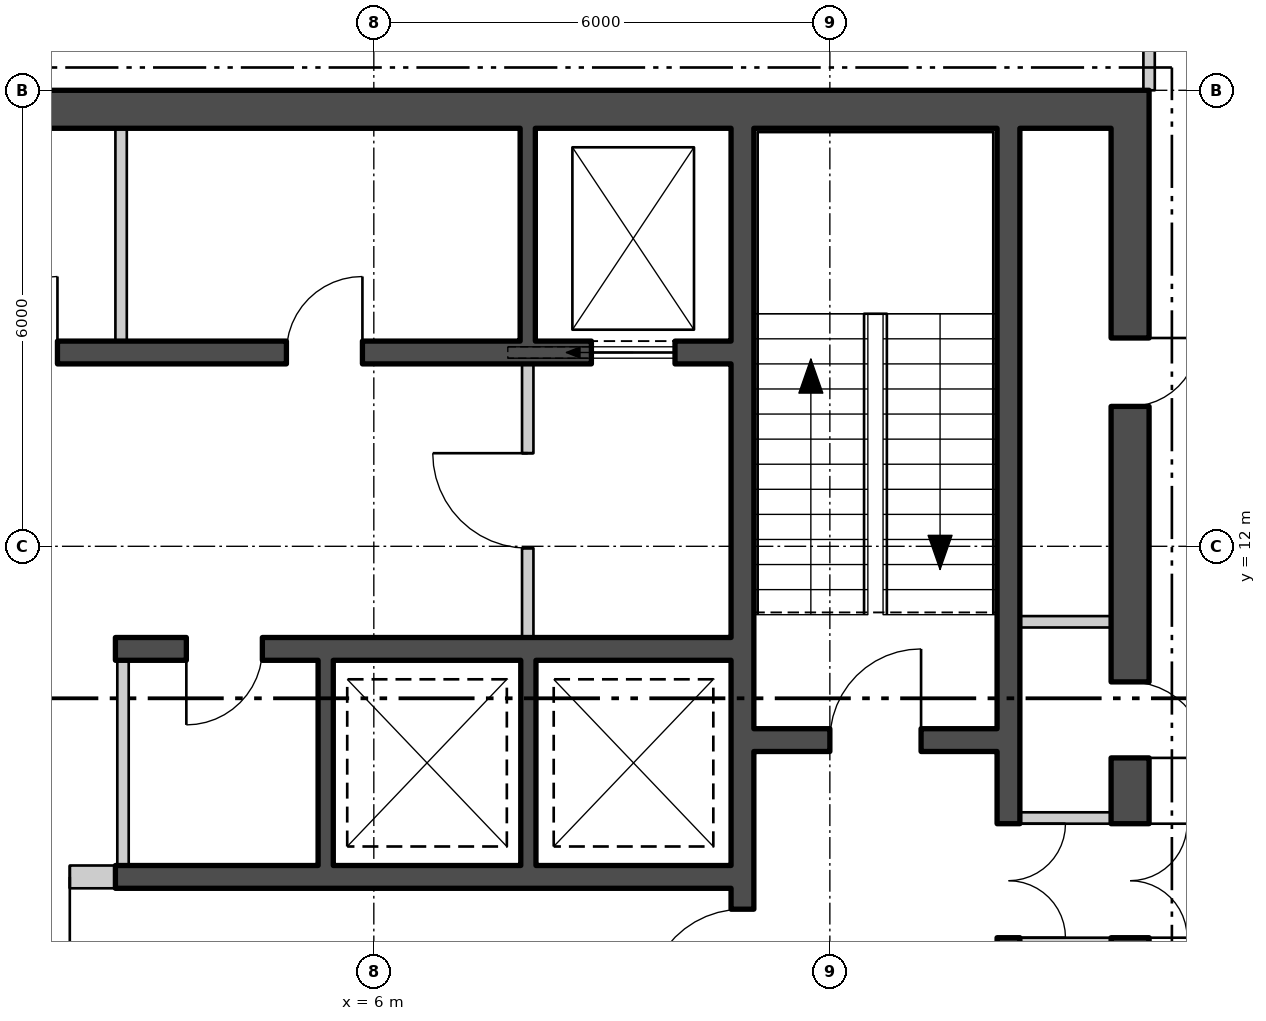
"""IFC4 building model, lengths in metres.
Left out: names, types, materials, properties, quantities, classifications, styles, units other than length and angle.
Written with IfcOpenShell. Run it as: python <this file> out.ifc"""

import sys

from ifc_helpers import new_model, si_unit, direction, frame, frame_2d, origin, place, context, subcontext, project, spatial, polyline, rectangle, outline, extrude, element, fill, save


model = new_model("IFC4")
c1 = context("Model", 3, precision=1e-05, world=origin(), true_north=direction((0.0, 1.0)))
c2 = subcontext(c1, "Body", "Model", "MODEL_VIEW")
j1 = project(units=[si_unit("LENGTHUNIT", "METRE"), si_unit("PLANEANGLEUNIT", "RADIAN")], contexts=[c1])
p1 = place(None, origin())
s1 = spatial("IfcSite", under=j1, at=p1, CompositionType="ELEMENT")
p2 = place(p1, origin())
s2 = spatial("IfcBuilding", under=s1, at=p2, CompositionType="ELEMENT")
p3 = place(p2, frame((0.0, 0.0, 174.9)))
s3 = spatial("IfcBuildingStorey", under=s2, at=p3, CompositionType="ELEMENT", Elevation=174.9)
p4 = place(p3, frame((3.9, -26.401, -0.18), z_axis=(0.0, 0.0, 1.0), x_axis=(0.500000335318, 0.866025210188, 0.0)))
e1 = element("IfcWall", 1, at=p4, inside=s3, PredefinedType="SOLIDWALL", context=c2, shape_type="SweptSolid", body=[
    extrude(outline(polyline([(-0.13, -0.225), (45.88, -0.225), (45.62, 0.225), (0.13, 0.225), (-0.13, -0.225)])), origin(), (0.0, 0.0, 1.0), 3.68),
])
p5 = place(p4, frame((1.425, 0.0, 1.08)))
e2 = element("IfcOpeningElement", 2, at=p5, cuts=e1, PredefinedType="OPENING", context=c2, shape_type="SweptSolid", body=[
    extrude(rectangle(XDim=2.4, YDim=2.0, at=frame_2d((1.2, 1.0))), frame((0.0, 0.235, 0.0), z_axis=(0.0, -1.0, 0.0), x_axis=(1.0, 0.0, 0.0)), (0.0, 0.0, 1.0), 0.47),
])
p6 = place(p4, frame((5.895, 0.0, 1.08)))
e3 = element("IfcOpeningElement", 3, at=p6, cuts=e1, PredefinedType="OPENING", context=c2, shape_type="SweptSolid", body=[
    extrude(rectangle(XDim=2.4, YDim=2.0, at=frame_2d((1.2, 1.0))), frame((0.0, 0.235, 0.0), z_axis=(0.0, -1.0, 0.0), x_axis=(1.0, 0.0, 0.0)), (0.0, 0.0, 1.0), 0.47),
])
p7 = place(p4, frame((10.403, 0.0, 1.08)))
e4 = element("IfcOpeningElement", 4, at=p7, cuts=e1, PredefinedType="OPENING", context=c2, shape_type="SweptSolid", body=[
    extrude(rectangle(XDim=2.4, YDim=2.0, at=frame_2d((1.2, 1.0))), frame((0.0, 0.235, 0.0), z_axis=(0.0, -1.0, 0.0), x_axis=(1.0, 0.0, 0.0)), (0.0, 0.0, 1.0), 0.47),
])
p8 = place(p4, frame((14.912, 0.0, 1.08)))
e5 = element("IfcOpeningElement", 5, at=p8, cuts=e1, PredefinedType="OPENING", context=c2, shape_type="SweptSolid", body=[
    extrude(rectangle(XDim=2.4, YDim=2.0, at=frame_2d((1.2, 1.0))), frame((0.0, 0.235, 0.0), z_axis=(0.0, -1.0, 0.0), x_axis=(1.0, 0.0, 0.0)), (0.0, 0.0, 1.0), 0.47),
])
p9 = place(p4, frame((19.421, 0.0, 1.08)))
e6 = element("IfcOpeningElement", 6, at=p9, cuts=e1, PredefinedType="OPENING", context=c2, shape_type="SweptSolid", body=[
    extrude(rectangle(XDim=2.4, YDim=2.0, at=frame_2d((1.2, 1.0))), frame((0.0, 0.235, 0.0), z_axis=(0.0, -1.0, 0.0), x_axis=(1.0, 0.0, 0.0)), (0.0, 0.0, 1.0), 0.47),
])
p10 = place(p4, frame((23.929, 0.0, 1.08)))
e7 = element("IfcOpeningElement", 7, at=p10, cuts=e1, PredefinedType="OPENING", context=c2, shape_type="SweptSolid", body=[
    extrude(rectangle(XDim=2.4, YDim=2.0, at=frame_2d((1.2, 1.0))), frame((0.0, 0.235, 0.0), z_axis=(0.0, -1.0, 0.0), x_axis=(1.0, 0.0, 0.0)), (0.0, 0.0, 1.0), 0.47),
])
p11 = place(p4, frame((37.455, 0.0, 1.08)))
e8 = element("IfcOpeningElement", 8, at=p11, cuts=e1, PredefinedType="OPENING", context=c2, shape_type="SweptSolid", body=[
    extrude(rectangle(XDim=2.4, YDim=2.0, at=frame_2d((1.2, 1.0))), frame((0.0, 0.235, 0.0), z_axis=(0.0, -1.0, 0.0), x_axis=(1.0, 0.0, 0.0)), (0.0, 0.0, 1.0), 0.47),
])
p12 = place(p4, frame((41.925, 0.0, 1.08)))
e9 = element("IfcOpeningElement", 9, at=p12, cuts=e1, PredefinedType="OPENING", context=c2, shape_type="SweptSolid", body=[
    extrude(rectangle(XDim=2.4, YDim=2.0, at=frame_2d((1.2, 1.0))), frame((0.0, 0.235, 0.0), z_axis=(0.0, -1.0, 0.0), x_axis=(1.0, 0.0, 0.0)), (0.0, 0.0, 1.0), 0.47),
])
p13 = place(p3, frame((-16.2, 17.75, 0.0), z_axis=(0.0, 0.0, 1.0), x_axis=(1.0, 0.0, 0.0)))
e10 = element("IfcWall", 10, at=p13, inside=s3, PredefinedType="SHEAR", context=c2, shape_type="SweptSolid", body=[
    extrude(rectangle(XDim=32.4, YDim=0.5, at=frame_2d((16.2, 0.0))), origin(), (0.0, 0.0, 1.0), 3.7),
])
p14 = place(p3, frame((15.95, 2.5, 0.0), z_axis=(0.0, 0.0, 1.0), x_axis=(0.0, 1.0, 0.0)))
e11 = element("IfcWall", 11, at=p14, inside=s3, PredefinedType="SHEAR", context=c2, shape_type="SweptSolid", body=[
    extrude(rectangle(XDim=15.0, YDim=0.5, at=frame_2d((7.5, 0.0))), origin(), (0.0, 0.0, 1.0), 3.7),
])
p15 = place(p14, frame((4.35, 0.0, 0.0)))
e12 = element("IfcOpeningElement", 12, at=p15, cuts=e11, PredefinedType="OPENING", context=c2, shape_type="SweptSolid", body=[
    extrude(rectangle(XDim=1.5, YDim=2.1, at=frame_2d((0.75, 1.05))), frame((0.0, 0.26, 0.0), z_axis=(0.0, -1.0, 0.0), x_axis=(1.0, 0.0, 0.0)), (0.0, 0.0, 1.0), 0.52),
])
p16 = place(p14, frame((0.825, 0.0, 0.0)))
e13 = element("IfcOpeningElement", 13, at=p16, cuts=e11, PredefinedType="OPENING", context=c2, shape_type="SweptSolid", body=[
    extrude(rectangle(XDim=0.9, YDim=2.1, at=frame_2d((0.45, 1.05))), frame((0.0, 0.26, 0.0), z_axis=(0.0, -1.0, 0.0), x_axis=(1.0, 0.0, 0.0)), (0.0, 0.0, 1.0), 0.52),
])
p17 = place(p14, frame((3.0, 0.0, 0.0)))
e14 = element("IfcOpeningElement", 14, at=p17, cuts=e11, PredefinedType="OPENING", context=c2, shape_type="SweptSolid", body=[
    extrude(rectangle(XDim=0.9, YDim=2.1, at=frame_2d((0.45, 1.05))), frame((0.0, 0.26, 0.0), z_axis=(0.0, -1.0, 0.0), x_axis=(1.0, 0.0, 0.0)), (0.0, 0.0, 1.0), 0.52),
])
p18 = place(p14, frame((6.716, 0.0, 0.0)))
e15 = element("IfcOpeningElement", 15, at=p18, cuts=e11, PredefinedType="OPENING", context=c2, shape_type="SweptSolid", body=[
    extrude(rectangle(XDim=1.0, YDim=2.1, at=frame_2d((0.5, 1.05))), frame((0.0, 0.26, 0.0), z_axis=(0.0, -1.0, 0.0), x_axis=(1.0, 0.0, 0.0)), (0.0, 0.0, 1.0), 0.52),
])
p19 = place(p14, frame((11.341, 0.0, 0.0)))
e16 = element("IfcOpeningElement", 16, at=p19, cuts=e11, PredefinedType="OPENING", context=c2, shape_type="SweptSolid", body=[
    extrude(rectangle(XDim=0.9, YDim=2.1, at=frame_2d((0.45, 1.05))), frame((0.0, 0.26, 0.0), z_axis=(0.0, -1.0, 0.0), x_axis=(1.0, 0.0, 0.0)), (0.0, 0.0, 1.0), 0.52),
])
p20 = place(p3, frame((10.85, 2.5, 0.0), z_axis=(0.0, 0.0, 1.0), x_axis=(0.0, 1.0, 0.0)))
e17 = element("IfcWall", 17, at=p20, inside=s3, PredefinedType="SHEAR", context=c2, shape_type="SweptSolid", body=[
    extrude(rectangle(XDim=15.0, YDim=0.3, at=frame_2d((7.5, 0.0))), origin(), (0.0, 0.0, 1.0), 3.7),
])
p21 = place(p20, frame((3.475, 0.0, 0.0)))
e18 = element("IfcOpeningElement", 18, at=p21, cuts=e17, PredefinedType="OPENING", context=c2, shape_type="SweptSolid", body=[
    extrude(rectangle(XDim=1.25, YDim=2.1, at=frame_2d((0.625, 1.05))), frame((0.0, 0.16, 0.0), z_axis=(0.0, -1.0, 0.0), x_axis=(1.0, 0.0, 0.0)), (0.0, 0.0, 1.0), 0.32),
])
p22 = place(p20, frame((1.125, 0.0, 0.0)))
e19 = element("IfcOpeningElement", 19, at=p22, cuts=e17, PredefinedType="OPENING", context=c2, shape_type="SweptSolid", body=[
    extrude(rectangle(XDim=1.0, YDim=2.1, at=frame_2d((0.5, 1.05))), frame((0.0, 0.16, 0.0), z_axis=(0.0, -1.0, 0.0), x_axis=(1.0, 0.0, 0.0)), (0.0, 0.0, 1.0), 0.32),
])
p23 = place(p3, frame((14.35, 2.5, 0.0), z_axis=(0.0, 0.0, 1.0), x_axis=(0.0, 1.0, 0.0)))
e20 = element("IfcWall", 20, at=p23, inside=s3, PredefinedType="SHEAR", context=c2, shape_type="SweptSolid", body=[
    extrude(rectangle(XDim=15.0, YDim=0.3, at=frame_2d((7.5, 0.0))), origin(), (0.0, 0.0, 1.0), 3.7),
])
p24 = place(p23, frame((4.35, 0.0, 0.0)))
e21 = element("IfcOpeningElement", 21, at=p24, cuts=e20, PredefinedType="OPENING", context=c2, shape_type="SweptSolid", body=[
    extrude(rectangle(XDim=1.5, YDim=2.1, at=frame_2d((0.75, 1.05))), frame((0.0, 0.16, 0.0), z_axis=(0.0, -1.0, 0.0), x_axis=(1.0, 0.0, 0.0)), (0.0, 0.0, 1.0), 0.32),
])
p25 = place(p3, frame((11.0, 9.45, 0.0), z_axis=(0.0, 0.0, 1.0), x_axis=(1.0, 0.0, 0.0)))
e22 = element("IfcWall", 22, at=p25, inside=s3, PredefinedType="SHEAR", context=c2, shape_type="SweptSolid", body=[
    extrude(rectangle(XDim=3.2, YDim=0.3, at=frame_2d((1.6, 0.0))), origin(), (0.0, 0.0, 1.0), 3.7),
])
p26 = place(p25, frame((1.0, 0.0, 0.0)))
e23 = element("IfcOpeningElement", 23, at=p26, cuts=e22, PredefinedType="OPENING", context=c2, shape_type="SweptSolid", body=[
    extrude(rectangle(XDim=1.2, YDim=2.1, at=frame_2d((0.6, 1.05))), frame((0.0, 0.16, 0.0), z_axis=(0.0, -1.0, 0.0), x_axis=(1.0, 0.0, 0.0)), (0.0, 0.0, 1.0), 0.32),
])
p27 = place(p3, frame((-10.7, 14.55, 0.0), z_axis=(0.0, 0.0, 1.0), x_axis=(1.0, 0.0, 0.0)))
e24 = element("IfcWall", 24, at=p27, inside=s3, PredefinedType="SHEAR", context=c2, shape_type="SweptSolid", body=[
    extrude(rectangle(XDim=21.4, YDim=0.3, at=frame_2d((10.7, 0.0))), origin(), (0.0, 0.0, 1.0), 3.7),
])
p28 = place(p27, frame((0.738, 0.0, 0.0)))
e25 = element("IfcOpeningElement", 25, at=p28, cuts=e24, PredefinedType="OPENING", context=c2, shape_type="SweptSolid", body=[
    extrude(rectangle(XDim=1.1, YDim=2.1, at=frame_2d((0.55, 1.05))), frame((0.0, 0.16, 0.0), z_axis=(0.0, -1.0, 0.0), x_axis=(1.0, 0.0, 0.0)), (0.0, 0.0, 1.0), 0.32),
])
p29 = place(p27, frame((3.462, 0.0, 0.0)))
e26 = element("IfcOpeningElement", 26, at=p29, cuts=e24, PredefinedType="OPENING", context=c2, shape_type="SweptSolid", body=[
    extrude(rectangle(XDim=1.1, YDim=2.1, at=frame_2d((0.55, 1.05))), frame((0.0, 0.16, 0.0), z_axis=(0.0, -1.0, 0.0), x_axis=(1.0, 0.0, 0.0)), (0.0, 0.0, 1.0), 0.32),
])
p30 = place(p27, frame((6.138, 0.0, 0.0)))
e27 = element("IfcOpeningElement", 27, at=p30, cuts=e24, PredefinedType="OPENING", context=c2, shape_type="SweptSolid", body=[
    extrude(rectangle(XDim=1.1, YDim=2.1, at=frame_2d((0.55, 1.05))), frame((0.0, 0.16, 0.0), z_axis=(0.0, -1.0, 0.0), x_axis=(1.0, 0.0, 0.0)), (0.0, 0.0, 1.0), 0.32),
])
p31 = place(p27, frame((8.812, 0.0, 0.0)))
e28 = element("IfcOpeningElement", 28, at=p31, cuts=e24, PredefinedType="OPENING", context=c2, shape_type="SweptSolid", body=[
    extrude(rectangle(XDim=1.1, YDim=2.1, at=frame_2d((0.55, 1.05))), frame((0.0, 0.16, 0.0), z_axis=(0.0, -1.0, 0.0), x_axis=(1.0, 0.0, 0.0)), (0.0, 0.0, 1.0), 0.32),
])
p32 = place(p27, frame((19.562, 0.0, 0.0)))
e29 = element("IfcOpeningElement", 29, at=p32, cuts=e24, PredefinedType="OPENING", context=c2, shape_type="SweptSolid", body=[
    extrude(rectangle(XDim=1.1, YDim=2.1, at=frame_2d((0.55, 1.05))), frame((0.0, 0.16, 0.0), z_axis=(0.0, -1.0, 0.0), x_axis=(1.0, 0.0, 0.0)), (0.0, 0.0, 1.0), 0.32),
])
p33 = place(p27, frame((11.537, 0.0, 0.0)))
e30 = element("IfcOpeningElement", 30, at=p33, cuts=e24, PredefinedType="OPENING", context=c2, shape_type="SweptSolid", body=[
    extrude(rectangle(XDim=1.0, YDim=2.1, at=frame_2d((0.5, 1.05))), frame((0.0, 0.16, 0.0), z_axis=(0.0, -1.0, 0.0), x_axis=(1.0, 0.0, 0.0)), (0.0, 0.0, 1.0), 0.32),
])
p34 = place(p27, frame((15.55, 0.0, 0.0)))
e31 = element("IfcOpeningElement", 31, at=p34, cuts=e24, PredefinedType="OPENING", context=c2, shape_type="SweptSolid", body=[
    extrude(rectangle(XDim=1.0, YDim=2.1, at=frame_2d((0.5, 1.05))), frame((0.0, 0.16, 0.0), z_axis=(0.0, -1.0, 0.0), x_axis=(1.0, 0.0, 0.0)), (0.0, 0.0, 1.0), 0.32),
])
p35 = place(p3, frame((2.6, 10.65, 0.0), z_axis=(0.0, 0.0, 1.0), x_axis=(1.0, 0.0, 0.0)))
e32 = element("IfcWall", 32, at=p35, inside=s3, PredefinedType="SHEAR", context=c2, shape_type="SweptSolid", body=[
    extrude(rectangle(XDim=8.1, YDim=0.3, at=frame_2d((4.05, 0.0))), origin(), (0.0, 0.0, 1.0), 3.7),
])
p36 = place(p35, frame((0.933, 0.0, 0.0)))
e33 = element("IfcOpeningElement", 33, at=p36, cuts=e32, PredefinedType="OPENING", context=c2, shape_type="SweptSolid", body=[
    extrude(rectangle(XDim=1.0, YDim=2.1, at=frame_2d((0.5, 1.05))), frame((0.0, 0.16, 0.0), z_axis=(0.0, -1.0, 0.0), x_axis=(1.0, 0.0, 0.0)), (0.0, 0.0, 1.0), 0.32),
])
p37 = place(p3, frame((2.6, 7.65, 0.0), z_axis=(0.0, 0.0, 1.0), x_axis=(1.0, 0.0, 0.0)))
e34 = element("IfcWall", 34, at=p37, inside=s3, PredefinedType="SHEAR", context=c2, shape_type="SweptSolid", body=[
    extrude(rectangle(XDim=8.1, YDim=0.3, at=frame_2d((4.05, 0.0))), origin(), (0.0, 0.0, 1.0), 3.7),
])
p38 = place(p3, frame((2.675, 14.7, 0.0), z_axis=(0.0, 0.0, 1.0), x_axis=(0.0, 1.0, 0.0)))
e35 = element("IfcWall", 35, at=p38, inside=s3, PredefinedType="PARTITIONING", context=c2, shape_type="SweptSolid", body=[
    extrude(rectangle(XDim=2.8, YDim=0.15, at=frame_2d((1.4, 0.0))), origin(), (0.0, 0.0, 1.0), 3.7),
])
p39 = place(p3, frame((8.025, 14.7, 0.0), z_axis=(0.0, 0.0, 1.0), x_axis=(0.0, 1.0, 0.0)))
e36 = element("IfcWall", 36, at=p39, inside=s3, PredefinedType="SHEAR", context=c2, shape_type="SweptSolid", body=[
    extrude(rectangle(XDim=2.8, YDim=0.2, at=frame_2d((1.4, 0.0))), origin(), (0.0, 0.0, 1.0), 3.7),
])
p40 = place(p3, frame((2.7, 7.8, 0.0), z_axis=(0.0, 0.0, 1.0), x_axis=(0.0, 1.0, 0.0)))
e37 = element("IfcWall", 37, at=p40, inside=s3, PredefinedType="PARTITIONING", context=c2, shape_type="SweptSolid", body=[
    extrude(rectangle(XDim=2.7, YDim=0.15, at=frame_2d((1.35, 0.0))), origin(), (0.0, 0.0, 1.0), 3.7),
])
for number, where, z_axis, x_axis in (
    (38, (5.367, 7.8, 0.0), (0.0, 0.0, 1.0), (0.0, 1.0, 0.0)),
    (39, (8.033, 7.8, 0.0), (0.0, 0.0, 1.0), (0.0, 1.0, 0.0)),
):
    element("IfcWall", number, at=place(p3, frame(where, z_axis=z_axis, x_axis=x_axis)), inside=s3, PredefinedType="SHEAR", context=c2, shape_type="SweptSolid", body=[
        extrude(rectangle(XDim=2.7, YDim=0.2, at=frame_2d((1.35, 0.0))), origin(), (0.0, 0.0, 1.0), 3.7),
    ])
p41 = place(p3, frame((8.025, 10.8, 0.0), z_axis=(0.0, 0.0, 1.0), x_axis=(0.0, 1.0, 0.0)))
e40 = element("IfcWall", 40, at=p41, inside=s3, PredefinedType="PARTITIONING", context=c2, shape_type="SweptSolid", body=[
    extrude(rectangle(XDim=3.6, YDim=0.15, at=frame_2d((1.8, 0.0))), origin(), (0.0, 0.0, 1.0), 3.7),
])
p42 = place(p41, frame((1.175, 0.0, 0.0)))
e41 = element("IfcOpeningElement", 41, at=p42, cuts=e40, PredefinedType="OPENING", context=c2, shape_type="SweptSolid", body=[
    extrude(rectangle(XDim=1.25, YDim=2.1, at=frame_2d((0.625, 1.05))), frame((0.0, 0.085, 0.0), z_axis=(0.0, -1.0, 0.0), x_axis=(1.0, 0.0, 0.0)), (0.0, 0.0, 1.0), 0.17),
])
for number, where, z_axis, x_axis in (
    (42, (14.5, 6.775, 0.0), (0.0, 0.0, 1.0), (1.0, 0.0, 0.0)),
    (43, (14.5, 8.425, 0.0), (0.0, 0.0, 1.0), (1.0, 0.0, 0.0)),
    (44, (14.5, 11.007, 0.0), (0.0, 0.0, 1.0), (1.0, 0.0, 0.0)),
):
    element("IfcWall", number, at=place(p3, frame(where, z_axis=z_axis, x_axis=x_axis)), inside=s3, PredefinedType="PARTITIONING", context=c2, shape_type="SweptSolid", body=[
        extrude(rectangle(XDim=1.2, YDim=0.15, at=frame_2d((0.6, 0.0))), origin(), (0.0, 0.0, 1.0), 3.7),
    ])
p43 = place(p3, frame((-0.4, 7.65, 0.0), z_axis=(0.0, 0.0, 1.0), x_axis=(1.0, 0.0, 0.0)))
e45 = element("IfcWall", 45, at=p43, inside=s3, PredefinedType="PARTITIONING", context=c2, shape_type="SweptSolid", body=[
    extrude(rectangle(XDim=3.0, YDim=0.3, at=frame_2d((1.5, 0.0))), origin(), (0.0, 0.0, 1.0), 3.7),
])
p44 = place(p43, frame((0.6, 0.0, 0.0)))
e46 = element("IfcOpeningElement", 46, at=p44, cuts=e45, PredefinedType="OPENING", context=c2, shape_type="SweptSolid", body=[
    extrude(rectangle(XDim=1.8, YDim=2.4, at=frame_2d((0.9, 1.2))), frame((0.0, 0.16, 0.0), z_axis=(0.0, -1.0, 0.0), x_axis=(1.0, 0.0, 0.0)), (0.0, 0.0, 1.0), 0.32),
])
p45 = place(p3, frame((16.2, 18.0, 0.0), z_axis=(0.0, 0.0, 1.0), x_axis=(0.0, 1.0, 0.0)))
e47 = element("IfcWall", 47, at=p45, inside=s3, PredefinedType="PARTITIONING", context=c2, shape_type="SweptSolid", body=[
    extrude(rectangle(XDim=1.75, YDim=0.15, at=frame_2d((0.875, 0.0))), origin(), (0.0, 0.0, 1.0), 3.7),
])
p46 = place(p32, origin())
e48 = element("IfcDoor", 48, at=p46, inside=s3, OperationType="SLIDING_TO_LEFT", PredefinedType="DOOR", context=c2, shape_type="SweptSolid", body=[
    extrude(rectangle(XDim=1.1, YDim=2.1, at=frame_2d((0.55, 1.05))), frame((0.0, 0.025, 0.0), z_axis=(0.0, -1.0, 0.0), x_axis=(1.0, 0.0, 0.0)), (0.0, 0.0, 1.0), 0.05),
])
fill(e29, e48)
p47 = place(p33, origin())
e49 = element("IfcDoor", 49, at=p47, inside=s3, OperationType="SINGLE_SWING_LEFT", PredefinedType="DOOR", context=c2, shape_type="SweptSolid", body=[
    extrude(rectangle(XDim=1.0, YDim=2.1, at=frame_2d((0.5, 1.05))), frame((0.0, 0.025, 0.0), z_axis=(0.0, -1.0, 0.0), x_axis=(1.0, 0.0, 0.0)), (0.0, 0.0, 1.0), 0.05),
])
fill(e30, e49)
p48 = place(p34, origin())
e50 = element("IfcDoor", 50, at=p48, inside=s3, OperationType="SINGLE_SWING_LEFT", PredefinedType="DOOR", context=c2, shape_type="SweptSolid", body=[
    extrude(rectangle(XDim=1.0, YDim=2.1, at=frame_2d((0.5, 1.05))), frame((0.0, 0.025, 0.0), z_axis=(0.0, -1.0, 0.0), x_axis=(1.0, 0.0, 0.0)), (0.0, 0.0, 1.0), 0.05),
])
fill(e31, e50)
p49 = place(p36, origin())
e51 = element("IfcDoor", 51, at=p49, inside=s3, OperationType="SINGLE_SWING_LEFT", PredefinedType="DOOR", context=c2, shape_type="SweptSolid", body=[
    extrude(rectangle(XDim=1.0, YDim=2.1, at=frame_2d((0.5, 1.05))), frame((0.0, 0.025, 0.0), z_axis=(0.0, -1.0, 0.0), x_axis=(1.0, 0.0, 0.0)), (0.0, 0.0, 1.0), 0.05),
])
fill(e33, e51)
p50 = place(p42, origin())
e52 = element("IfcDoor", 52, at=p50, inside=s3, OperationType="SINGLE_SWING_LEFT", PredefinedType="DOOR", context=c2, shape_type="SweptSolid", body=[
    extrude(rectangle(XDim=1.25, YDim=2.1, at=frame_2d((0.625, 1.05))), frame((0.0, 0.025, 0.0), z_axis=(0.0, -1.0, 0.0), x_axis=(1.0, 0.0, 0.0)), (0.0, 0.0, 1.0), 0.05),
])
fill(e41, e52)
p51 = place(p26, origin())
e53 = element("IfcDoor", 53, at=p51, inside=s3, OperationType="SINGLE_SWING_LEFT", PredefinedType="DOOR", context=c2, shape_type="SweptSolid", body=[
    extrude(rectangle(XDim=1.2, YDim=2.1, at=frame_2d((0.6, 1.05))), frame((0.0, 0.025, 0.0), z_axis=(0.0, -1.0, 0.0), x_axis=(1.0, 0.0, 0.0)), (0.0, 0.0, 1.0), 0.05),
])
fill(e23, e53)
p52 = place(p21, origin())
e54 = element("IfcDoor", 54, at=p52, inside=s3, OperationType="SINGLE_SWING_RIGHT", PredefinedType="DOOR", context=c2, shape_type="SweptSolid", body=[
    extrude(rectangle(XDim=1.25, YDim=2.1, at=frame_2d((0.625, 1.05))), frame((0.0, 0.025, 0.0), z_axis=(0.0, -1.0, 0.0), x_axis=(1.0, 0.0, 0.0)), (0.0, 0.0, 1.0), 0.05),
])
fill(e18, e54)
p53 = place(p24, origin())
e55 = element("IfcDoor", 55, at=p53, inside=s3, OperationType="DOUBLE_DOOR_SINGLE_SWING", PredefinedType="DOOR", context=c2, shape_type="SweptSolid", body=[
    extrude(rectangle(XDim=1.5, YDim=2.1, at=frame_2d((0.75, 1.05))), frame((0.0, 0.025, 0.0), z_axis=(0.0, -1.0, 0.0), x_axis=(1.0, 0.0, 0.0)), (0.0, 0.0, 1.0), 0.05),
])
fill(e21, e55)
p54 = place(p15, origin())
e56 = element("IfcDoor", 56, at=p54, inside=s3, OperationType="DOUBLE_DOOR_SINGLE_SWING", PredefinedType="DOOR", context=c2, shape_type="SweptSolid", body=[
    extrude(rectangle(XDim=1.5, YDim=2.1, at=frame_2d((0.75, 1.05))), frame((0.0, 0.025, 0.0), z_axis=(0.0, -1.0, 0.0), x_axis=(1.0, 0.0, 0.0)), (0.0, 0.0, 1.0), 0.05),
])
fill(e12, e56)
p55 = place(p18, origin())
e57 = element("IfcDoor", 57, at=p55, inside=s3, OperationType="SINGLE_SWING_LEFT", PredefinedType="DOOR", context=c2, shape_type="SweptSolid", body=[
    extrude(rectangle(XDim=1.0, YDim=2.1, at=frame_2d((0.5, 1.05))), frame((0.0, 0.025, 0.0), z_axis=(0.0, -1.0, 0.0), x_axis=(1.0, 0.0, 0.0)), (0.0, 0.0, 1.0), 0.05),
])
fill(e15, e57)
p56 = place(p19, origin())
e58 = element("IfcDoor", 58, at=p56, inside=s3, OperationType="SINGLE_SWING_RIGHT", PredefinedType="DOOR", context=c2, shape_type="SweptSolid", body=[
    extrude(rectangle(XDim=0.9, YDim=2.1, at=frame_2d((0.45, 1.05))), frame((0.0, 0.025, 0.0), z_axis=(0.0, -1.0, 0.0), x_axis=(1.0, 0.0, 0.0)), (0.0, 0.0, 1.0), 0.05),
])
fill(e16, e58)
p57 = place(p44, origin())
e59 = element("IfcDoor", 59, at=p57, inside=s3, OperationType="DOUBLE_DOOR_SINGLE_SWING", PredefinedType="DOOR", context=c2, shape_type="SweptSolid", body=[
    extrude(rectangle(XDim=1.8, YDim=2.4, at=frame_2d((0.9, 1.2))), frame((0.0, 0.025, 0.0), z_axis=(0.0, -1.0, 0.0), x_axis=(1.0, 0.0, 0.0)), (0.0, 0.0, 1.0), 0.05),
])
fill(e46, e59)
save(model, sys.argv[1])
